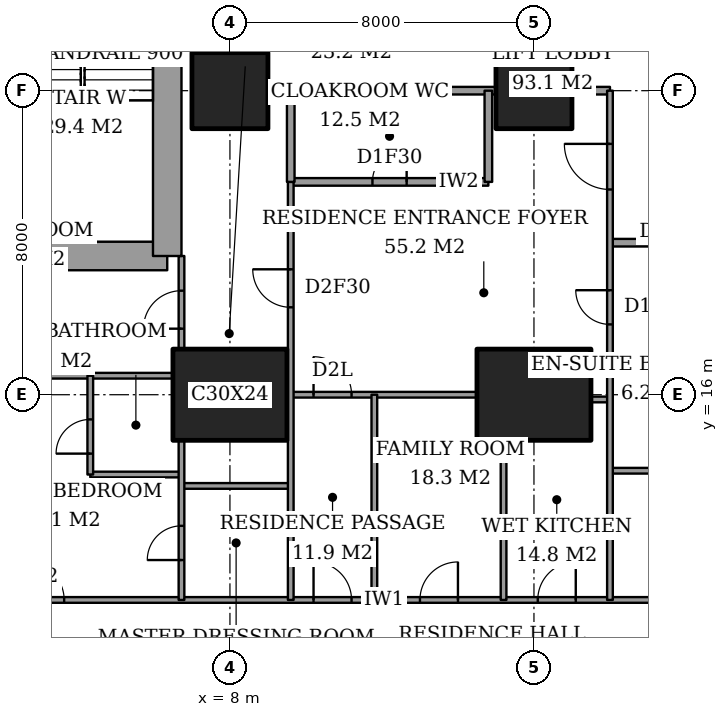
"""IFC4 building model, lengths in metres.
Left out: names, types, materials, properties, quantities, classifications, styles, units other than length and angle.
Written with IfcOpenShell. Run it as: python <this file> out.ifc"""

import sys

from ifc_helpers import new_model, si_unit, direction, frame, frame_2d, origin, origin_2d, place, context, subcontext, project, spatial, rectangle, extrude, element, fill, save


model = new_model("IFC4")
c1 = context("Model", 3, precision=1e-05, world=origin(), true_north=direction((0.0, 1.0)))
c2 = subcontext(c1, "Body", "Model", "MODEL_VIEW")
j1 = project(units=[si_unit("LENGTHUNIT", "METRE"), si_unit("PLANEANGLEUNIT", "RADIAN")], contexts=[c1])
p1 = place(None, origin())
s1 = spatial("IfcSite", under=j1, at=p1, CompositionType="ELEMENT")
p2 = place(p1, origin())
s2 = spatial("IfcBuilding", under=s1, at=p2, CompositionType="ELEMENT")
p3 = place(p2, frame((0.0, 0.0, 87.2)))
s3 = spatial("IfcBuildingStorey", under=s2, at=p3, CompositionType="ELEMENT", Elevation=87.2)
p4 = place(p3, frame((8.0, 16.0, 0.0), z_axis=(0.0, 0.0, 1.0), x_axis=(1.0, 0.0, 0.0)))
e1 = element("IfcColumn", 1, at=p4, inside=s3, PredefinedType="COLUMN", context=c2, shape_type="SweptSolid", body=[
    extrude(rectangle(XDim=3.0, YDim=2.4, at=origin_2d()), origin(), (0.0, 0.0, 1.0), 3.6),
])
p5 = place(p3, frame((8.0, 24.0, 0.0), z_axis=(0.0, 0.0, 1.0), x_axis=(1.0, 0.0, 0.0)))
e2 = element("IfcColumn", 2, at=p5, inside=s3, PredefinedType="COLUMN", context=c2, shape_type="SweptSolid", body=[
    extrude(rectangle(XDim=2.0, YDim=2.0, at=origin_2d()), origin(), (0.0, 0.0, 1.0), 3.6),
])
p6 = place(p3, frame((16.0, 16.0, 0.0), z_axis=(0.0, 0.0, 1.0), x_axis=(1.0, 0.0, 0.0)))
e3 = element("IfcColumn", 3, at=p6, inside=s3, PredefinedType="COLUMN", context=c2, shape_type="SweptSolid", body=[
    extrude(rectangle(XDim=3.0, YDim=2.4, at=origin_2d()), origin(), (0.0, 0.0, 1.0), 3.6),
])
p7 = place(p3, frame((16.0, 24.0, 0.0), z_axis=(0.0, 0.0, 1.0), x_axis=(1.0, 0.0, 0.0)))
e4 = element("IfcColumn", 4, at=p7, inside=s3, PredefinedType="COLUMN", context=c2, shape_type="SweptSolid", body=[
    extrude(rectangle(XDim=2.0, YDim=2.0, at=origin_2d()), origin(), (0.0, 0.0, 1.0), 3.6),
])
p8 = place(p3, frame((1.9, 19.65, 0.0), z_axis=(0.0, 0.0, 1.0), x_axis=(1.0, 0.0, 0.0)))
e5 = element("IfcWall", 5, at=p8, inside=s3, PredefinedType="SHEAR", context=c2, shape_type="SweptSolid", body=[
    extrude(rectangle(XDim=4.45, YDim=0.75, at=frame_2d((2.225, 0.0))), origin(), (0.0, 0.0, 1.0), 3.6),
])
p9 = place(p3, frame((6.35, 19.65, 0.0), z_axis=(0.0, 0.0, 1.0), x_axis=(0.0, 1.0, 0.0)))
e6 = element("IfcWall", 6, at=p9, inside=s3, PredefinedType="SHEAR", context=c2, shape_type="SweptSolid", body=[
    extrude(rectangle(XDim=8.7, YDim=0.75, at=frame_2d((4.35, 0.0))), origin(), (0.0, 0.0, 1.0), 3.6),
])
p10 = place(p9, frame((6.725, 0.0, 0.0)))
e7 = element("IfcOpeningElement", 7, at=p10, cuts=e6, PredefinedType="OPENING", context=c2, shape_type="SweptSolid", body=[
    extrude(rectangle(XDim=1.0, YDim=2.1, at=frame_2d((0.5, 1.05))), frame((0.0, 0.385, 0.0), z_axis=(0.0, -1.0, 0.0), x_axis=(1.0, 0.0, 0.0)), (0.0, 0.0, 1.0), 0.77),
])
p11 = place(p3, frame((-0.45, 10.6, 0.0), z_axis=(0.0, 0.0, 1.0), x_axis=(1.0, 0.0, 0.0)))
e8 = element("IfcWall", 8, at=p11, inside=s3, PredefinedType="PARTITIONING", context=c2, shape_type="SweptSolid", body=[
    extrude(rectangle(XDim=25.011, YDim=0.15, at=frame_2d((12.505, 0.0))), origin(), (0.0, 0.0, 1.0), 3.25),
])
p12 = place(p11, frame((10.65, 0.0, 0.0)))
e9 = element("IfcOpeningElement", 9, at=p12, cuts=e8, PredefinedType="OPENING", context=c2, shape_type="SweptSolid", body=[
    extrude(rectangle(XDim=1.0, YDim=2.1, at=frame_2d((0.5, 1.05))), frame((0.0, 0.085, 0.0), z_axis=(0.0, -1.0, 0.0), x_axis=(1.0, 0.0, 0.0)), (0.0, 0.0, 1.0), 0.17),
])
p13 = place(p11, frame((3.087, 0.0, 0.0)))
e10 = element("IfcOpeningElement", 10, at=p13, cuts=e8, PredefinedType="OPENING", context=c2, shape_type="SweptSolid", body=[
    extrude(rectangle(XDim=1.0, YDim=2.1, at=frame_2d((0.5, 1.05))), frame((0.0, 0.085, 0.0), z_axis=(0.0, -1.0, 0.0), x_axis=(1.0, 0.0, 0.0)), (0.0, 0.0, 1.0), 0.17),
])
p14 = place(p11, frame((13.45, 0.0, 0.0)))
e11 = element("IfcOpeningElement", 11, at=p14, cuts=e8, PredefinedType="OPENING", context=c2, shape_type="SweptSolid", body=[
    extrude(rectangle(XDim=1.0, YDim=2.1, at=frame_2d((0.5, 1.05))), frame((0.0, 0.085, 0.0), z_axis=(0.0, -1.0, 0.0), x_axis=(1.0, 0.0, 0.0)), (0.0, 0.0, 1.0), 0.17),
])
p15 = place(p11, frame((16.55, 0.0, 0.0)))
e12 = element("IfcOpeningElement", 12, at=p15, cuts=e8, PredefinedType="OPENING", context=c2, shape_type="SweptSolid", body=[
    extrude(rectangle(XDim=1.0, YDim=2.1, at=frame_2d((0.5, 1.05))), frame((0.0, 0.085, 0.0), z_axis=(0.0, -1.0, 0.0), x_axis=(1.0, 0.0, 0.0)), (0.0, 0.0, 1.0), 0.17),
])
p16 = place(p11, frame((21.175, 0.0, 0.0)))
e13 = element("IfcOpeningElement", 13, at=p16, cuts=e8, PredefinedType="OPENING", context=c2, shape_type="SweptSolid", body=[
    extrude(rectangle(XDim=1.0, YDim=2.1, at=frame_2d((0.5, 1.05))), frame((0.0, 0.085, 0.0), z_axis=(0.0, -1.0, 0.0), x_axis=(1.0, 0.0, 0.0)), (0.0, 0.0, 1.0), 0.17),
])
p17 = place(p3, frame((6.725, 13.6, 0.0), z_axis=(0.0, 0.0, 1.0), x_axis=(1.0, 0.0, 0.0)))
e14 = element("IfcWall", 14, at=p17, inside=s3, PredefinedType="PARTITIONING", context=c2, shape_type="SweptSolid", body=[
    extrude(rectangle(XDim=2.875, YDim=0.15, at=frame_2d((1.438, 0.0))), origin(), (0.0, 0.0, 1.0), 3.25),
])
p18 = place(p3, frame((4.325, 13.9, 0.0), z_axis=(0.0, 0.0, 1.0), x_axis=(1.0, 0.0, 0.0)))
e15 = element("IfcWall", 15, at=p18, inside=s3, PredefinedType="PARTITIONING", context=c2, shape_type="SweptSolid", body=[
    extrude(rectangle(XDim=2.4, YDim=0.15, at=frame_2d((1.2, 0.0))), origin(), (0.0, 0.0, 1.0), 3.25),
])
p19 = place(p3, frame((18.0, 14.0, 0.0), z_axis=(0.0, 0.0, 1.0), x_axis=(1.0, 0.0, 0.0)))
e16 = element("IfcWall", 16, at=p19, inside=s3, PredefinedType="PARTITIONING", context=c2, shape_type="SweptSolid", body=[
    extrude(rectangle(XDim=2.4, YDim=0.15, at=frame_2d((1.2, 0.0))), origin(), (0.0, 0.0, 1.0), 3.25),
])
p20 = place(p3, frame((17.5, 15.875, 0.0), z_axis=(0.0, 0.0, 1.0), x_axis=(1.0, 0.0, 0.0)))
e17 = element("IfcWall", 17, at=p20, inside=s3, PredefinedType="PARTITIONING", context=c2, shape_type="SweptSolid", body=[
    extrude(rectangle(XDim=0.5, YDim=0.15, at=frame_2d((0.25, 0.0))), origin(), (0.0, 0.0, 1.0), 3.25),
])
p21 = place(p3, frame((9.6, 16.0, 0.0), z_axis=(0.0, 0.0, 1.0), x_axis=(1.0, 0.0, 0.0)))
e18 = element("IfcWall", 18, at=p21, inside=s3, PredefinedType="PARTITIONING", context=c2, shape_type="SweptSolid", body=[
    extrude(rectangle(XDim=4.9, YDim=0.15, at=frame_2d((2.45, 0.0))), origin(), (0.0, 0.0, 1.0), 3.25),
])
p22 = place(p21, frame((0.6, 0.0, 0.0)))
e19 = element("IfcOpeningElement", 19, at=p22, cuts=e18, PredefinedType="OPENING", context=c2, shape_type="SweptSolid", body=[
    extrude(rectangle(XDim=1.0, YDim=2.0, at=frame_2d((0.5, 1.0))), frame((0.0, 0.085, 0.0), z_axis=(0.0, -1.0, 0.0), x_axis=(1.0, 0.0, 0.0)), (0.0, 0.0, 1.0), 0.17),
])
p23 = place(p3, frame((1.35, 16.5, 0.0), z_axis=(0.0, 0.0, 1.0), x_axis=(1.0, 0.0, 0.0)))
e20 = element("IfcWall", 20, at=p23, inside=s3, PredefinedType="PARTITIONING", context=c2, shape_type="SweptSolid", body=[
    extrude(rectangle(XDim=5.15, YDim=0.15, at=frame_2d((2.575, 0.0))), origin(), (0.0, 0.0, 1.0), 3.25),
])
p24 = place(p3, frame((18.0, 16.6, 0.0), z_axis=(0.0, 0.0, 1.0), x_axis=(1.0, 0.0, 0.0)))
e21 = element("IfcWall", 21, at=p24, inside=s3, PredefinedType="PARTITIONING", context=c2, shape_type="SweptSolid", body=[
    extrude(rectangle(XDim=6.0, YDim=0.15, at=frame_2d((3.0, 0.0))), origin(), (0.0, 0.0, 1.0), 3.25),
])
p25 = place(p3, frame((18.0, 20.0, 0.0), z_axis=(0.0, 0.0, 1.0), x_axis=(1.0, 0.0, 0.0)))
e22 = element("IfcWall", 22, at=p25, inside=s3, PredefinedType="PARTITIONING", context=c2, shape_type="SweptSolid", body=[
    extrude(rectangle(XDim=6.0, YDim=0.2, at=frame_2d((3.0, 0.0))), origin(), (0.0, 0.0, 1.0), 3.25),
])
p26 = place(p3, frame((9.6, 21.6, 0.0), z_axis=(0.0, 0.0, 1.0), x_axis=(1.0, 0.0, 0.0)))
e23 = element("IfcWall", 23, at=p26, inside=s3, PredefinedType="PARTITIONING", context=c2, shape_type="SweptSolid", body=[
    extrude(rectangle(XDim=5.2, YDim=0.2, at=frame_2d((2.6, 0.0))), origin(), (0.0, 0.0, 1.0), 3.25),
])
p27 = place(p26, frame((2.15, 0.0, 0.0)))
e24 = element("IfcOpeningElement", 24, at=p27, cuts=e23, PredefinedType="OPENING", context=c2, shape_type="SweptSolid", body=[
    extrude(rectangle(XDim=0.9, YDim=2.1, at=frame_2d((0.45, 1.05))), frame((0.0, 0.11, 0.0), z_axis=(0.0, -1.0, 0.0), x_axis=(1.0, 0.0, 0.0)), (0.0, 0.0, 1.0), 0.22),
])
p28 = place(p3, frame((9.0, 24.0, 0.0), z_axis=(0.0, 0.0, 1.0), x_axis=(1.0, 0.0, 0.0)))
e25 = element("IfcWall", 25, at=p28, inside=s3, PredefinedType="PARTITIONING", context=c2, shape_type="SweptSolid", body=[
    extrude(rectangle(XDim=6.0, YDim=0.2, at=frame_2d((3.0, 0.0))), origin(), (0.0, 0.0, 1.0), 3.25),
])
p29 = place(p3, frame((17.0, 24.0, 0.0), z_axis=(0.0, 0.0, 1.0), x_axis=(1.0, 0.0, 0.0)))
e26 = element("IfcWall", 26, at=p29, inside=s3, PredefinedType="PARTITIONING", context=c2, shape_type="SweptSolid", body=[
    extrude(rectangle(XDim=1.0, YDim=0.2, at=frame_2d((0.5, 0.0))), origin(), (0.0, 0.0, 1.0), 3.25),
])
p30 = place(p3, frame((4.325, 13.9, 0.0), z_axis=(0.0, 0.0, 1.0), x_axis=(0.0, 1.0, 0.0)))
e27 = element("IfcWall", 27, at=p30, inside=s3, PredefinedType="PARTITIONING", context=c2, shape_type="SweptSolid", body=[
    extrude(rectangle(XDim=2.6, YDim=0.15, at=frame_2d((1.3, 0.0))), origin(), (0.0, 0.0, 1.0), 3.25),
])
p31 = place(p30, frame((0.55, 0.0, 0.0)))
e28 = element("IfcOpeningElement", 28, at=p31, cuts=e27, PredefinedType="OPENING", context=c2, shape_type="SweptSolid", body=[
    extrude(rectangle(XDim=0.9, YDim=2.1, at=frame_2d((0.45, 1.05))), frame((0.0, 0.085, 0.0), z_axis=(0.0, -1.0, 0.0), x_axis=(1.0, 0.0, 0.0)), (0.0, 0.0, 1.0), 0.17),
])
p32 = place(p3, frame((6.725, 10.6, 0.0), z_axis=(0.0, 0.0, 1.0), x_axis=(0.0, 1.0, 0.0)))
e29 = element("IfcWall", 29, at=p32, inside=s3, PredefinedType="PARTITIONING", context=c2, shape_type="SweptSolid", body=[
    extrude(rectangle(XDim=4.2, YDim=0.15, at=frame_2d((2.1, 0.0))), origin(), (0.0, 0.0, 1.0), 3.25),
])
p33 = place(p32, frame((1.05, 0.0, 0.0)))
e30 = element("IfcOpeningElement", 30, at=p33, cuts=e29, PredefinedType="OPENING", context=c2, shape_type="SweptSolid", body=[
    extrude(rectangle(XDim=0.9, YDim=2.1, at=frame_2d((0.45, 1.05))), frame((0.0, 0.085, 0.0), z_axis=(0.0, -1.0, 0.0), x_axis=(1.0, 0.0, 0.0)), (0.0, 0.0, 1.0), 0.17),
])
p34 = place(p3, frame((6.725, 17.2, 0.0), z_axis=(0.0, 0.0, 1.0), x_axis=(0.0, 1.0, 0.0)))
e31 = element("IfcWall", 31, at=p34, inside=s3, PredefinedType="PARTITIONING", context=c2, shape_type="SweptSolid", body=[
    extrude(rectangle(XDim=2.45, YDim=0.15, at=frame_2d((1.225, 0.0))), origin(), (0.0, 0.0, 1.0), 3.25),
])
p35 = place(p34, frame((0.538, 0.0, 0.0)))
e32 = element("IfcOpeningElement", 32, at=p35, cuts=e31, PredefinedType="OPENING", context=c2, shape_type="SweptSolid", body=[
    extrude(rectangle(XDim=1.0, YDim=2.1, at=frame_2d((0.5, 1.05))), frame((0.0, 0.085, 0.0), z_axis=(0.0, -1.0, 0.0), x_axis=(1.0, 0.0, 0.0)), (0.0, 0.0, 1.0), 0.17),
])
p36 = place(p3, frame((9.6, 21.6, 0.0), z_axis=(0.0, 0.0, 1.0), x_axis=(0.0, 1.0, 0.0)))
e33 = element("IfcWall", 33, at=p36, inside=s3, PredefinedType="PARTITIONING", context=c2, shape_type="SweptSolid", body=[
    extrude(rectangle(XDim=2.4, YDim=0.2, at=frame_2d((1.2, 0.0))), origin(), (0.0, 0.0, 1.0), 3.25),
])
p37 = place(p3, frame((9.6, 10.6, 0.0), z_axis=(0.0, 0.0, 1.0), x_axis=(0.0, 1.0, 0.0)))
e34 = element("IfcWall", 34, at=p37, inside=s3, PredefinedType="PARTITIONING", context=c2, shape_type="SweptSolid", body=[
    extrude(rectangle(XDim=11.0, YDim=0.15, at=frame_2d((5.5, 0.0))), origin(), (0.0, 0.0, 1.0), 3.25),
])
p38 = place(p37, frame((7.7, 0.0, 0.0)))
e35 = element("IfcOpeningElement", 35, at=p38, cuts=e34, PredefinedType="OPENING", context=c2, shape_type="SweptSolid", body=[
    extrude(rectangle(XDim=1.0, YDim=2.1, at=frame_2d((0.5, 1.05))), frame((0.0, 0.085, 0.0), z_axis=(0.0, -1.0, 0.0), x_axis=(1.0, 0.0, 0.0)), (0.0, 0.0, 1.0), 0.17),
])
p39 = place(p3, frame((11.8, 10.6, 0.0), z_axis=(0.0, 0.0, 1.0), x_axis=(0.0, 1.0, 0.0)))
e36 = element("IfcWall", 36, at=p39, inside=s3, PredefinedType="PARTITIONING", context=c2, shape_type="SweptSolid", body=[
    extrude(rectangle(XDim=5.4, YDim=0.15, at=frame_2d((2.7, 0.0))), origin(), (0.0, 0.0, 1.0), 3.25),
])
p40 = place(p3, frame((14.8, 21.6, 0.0), z_axis=(0.0, 0.0, 1.0), x_axis=(0.0, 1.0, 0.0)))
e37 = element("IfcWall", 37, at=p40, inside=s3, PredefinedType="PARTITIONING", context=c2, shape_type="SweptSolid", body=[
    extrude(rectangle(XDim=2.4, YDim=0.2, at=frame_2d((1.2, 0.0))), origin(), (0.0, 0.0, 1.0), 3.25),
])
p41 = place(p3, frame((15.2, 10.6, 0.0), z_axis=(0.0, 0.0, 1.0), x_axis=(0.0, 1.0, 0.0)))
e38 = element("IfcWall", 38, at=p41, inside=s3, PredefinedType="PARTITIONING", context=c2, shape_type="SweptSolid", body=[
    extrude(rectangle(XDim=4.2, YDim=0.15, at=frame_2d((2.1, 0.0))), origin(), (0.0, 0.0, 1.0), 3.25),
])
p42 = place(p3, frame((18.0, 10.6, 0.0), z_axis=(0.0, 0.0, 1.0), x_axis=(0.0, 1.0, 0.0)))
e39 = element("IfcWall", 39, at=p42, inside=s3, PredefinedType="PARTITIONING", context=c2, shape_type="SweptSolid", body=[
    extrude(rectangle(XDim=13.4, YDim=0.15, at=frame_2d((6.7, 0.0))), origin(), (0.0, 0.0, 1.0), 3.25),
])
p43 = place(p42, frame((10.8, 0.0, 0.0)))
e40 = element("IfcOpeningElement", 40, at=p43, cuts=e39, PredefinedType="OPENING", context=c2, shape_type="SweptSolid", body=[
    extrude(rectangle(XDim=1.2, YDim=2.4, at=frame_2d((0.6, 1.2))), frame((0.0, 0.085, 0.0), z_axis=(0.0, -1.0, 0.0), x_axis=(1.0, 0.0, 0.0)), (0.0, 0.0, 1.0), 0.17),
])
p44 = place(p42, frame((7.25, 0.0, 0.0)))
e41 = element("IfcOpeningElement", 41, at=p44, cuts=e39, PredefinedType="OPENING", context=c2, shape_type="SweptSolid", body=[
    extrude(rectangle(XDim=0.9, YDim=2.1, at=frame_2d((0.45, 1.05))), frame((0.0, 0.085, 0.0), z_axis=(0.0, -1.0, 0.0), x_axis=(1.0, 0.0, 0.0)), (0.0, 0.0, 1.0), 0.17),
])
p45 = place(p12, origin())
e42 = element("IfcDoor", 42, at=p45, inside=s3, OperationType="SINGLE_SWING_RIGHT", PredefinedType="DOOR", context=c2, shape_type="SweptSolid", body=[
    extrude(rectangle(XDim=1.0, YDim=2.1, at=frame_2d((0.5, 1.05))), frame((0.0, 0.025, 0.0), z_axis=(0.0, -1.0, 0.0), x_axis=(1.0, 0.0, 0.0)), (0.0, 0.0, 1.0), 0.05),
])
fill(e9, e42)
p46 = place(p31, origin())
e43 = element("IfcDoor", 43, at=p46, inside=s3, OperationType="SINGLE_SWING_RIGHT", PredefinedType="DOOR", context=c2, shape_type="SweptSolid", body=[
    extrude(rectangle(XDim=0.9, YDim=2.1, at=frame_2d((0.45, 1.05))), frame((0.0, 0.025, 0.0), z_axis=(0.0, -1.0, 0.0), x_axis=(1.0, 0.0, 0.0)), (0.0, 0.0, 1.0), 0.05),
])
fill(e28, e43)
p47 = place(p13, origin())
e44 = element("IfcDoor", 44, at=p47, inside=s3, OperationType="SINGLE_SWING_RIGHT", PredefinedType="DOOR", context=c2, shape_type="SweptSolid", body=[
    extrude(rectangle(XDim=1.0, YDim=2.1, at=frame_2d((0.5, 1.05))), frame((0.0, 0.025, 0.0), z_axis=(0.0, -1.0, 0.0), x_axis=(1.0, 0.0, 0.0)), (0.0, 0.0, 1.0), 0.05),
])
fill(e10, e44)
p48 = place(p35, origin())
e45 = element("IfcDoor", 45, at=p48, inside=s3, OperationType="SINGLE_SWING_RIGHT", PredefinedType="DOOR", context=c2, shape_type="SweptSolid", body=[
    extrude(rectangle(XDim=1.0, YDim=2.1, at=frame_2d((0.5, 1.05))), frame((0.0, 0.025, 0.0), z_axis=(0.0, -1.0, 0.0), x_axis=(1.0, 0.0, 0.0)), (0.0, 0.0, 1.0), 0.05),
])
fill(e32, e45)
p49 = place(p33, origin())
e46 = element("IfcDoor", 46, at=p49, inside=s3, OperationType="SINGLE_SWING_RIGHT", PredefinedType="DOOR", context=c2, shape_type="SweptSolid", body=[
    extrude(rectangle(XDim=0.9, YDim=2.1, at=frame_2d((0.45, 1.05))), frame((0.0, 0.025, 0.0), z_axis=(0.0, -1.0, 0.0), x_axis=(1.0, 0.0, 0.0)), (0.0, 0.0, 1.0), 0.05),
])
fill(e30, e46)
p50 = place(p38, origin())
e47 = element("IfcDoor", 47, at=p50, inside=s3, OperationType="SINGLE_SWING_LEFT", PredefinedType="DOOR", context=c2, shape_type="SweptSolid", body=[
    extrude(rectangle(XDim=1.0, YDim=2.1, at=frame_2d((0.5, 1.05))), frame((0.0, 0.025, 0.0), z_axis=(0.0, -1.0, 0.0), x_axis=(1.0, 0.0, 0.0)), (0.0, 0.0, 1.0), 0.05),
])
fill(e35, e47)
p51 = place(p27, origin())
e48 = element("IfcDoor", 48, at=p51, inside=s3, OperationType="SINGLE_SWING_LEFT", PredefinedType="DOOR", context=c2, shape_type="SweptSolid", body=[
    extrude(rectangle(XDim=0.9, YDim=2.1, at=frame_2d((0.45, 1.05))), frame((0.0, 0.025, 0.0), z_axis=(0.0, -1.0, 0.0), x_axis=(1.0, 0.0, 0.0)), (0.0, 0.0, 1.0), 0.05),
])
fill(e24, e48)
p52 = place(p43, origin())
e49 = element("IfcDoor", 49, at=p52, inside=s3, OperationType="SINGLE_SWING_LEFT", PredefinedType="DOOR", context=c2, shape_type="SweptSolid", body=[
    extrude(rectangle(XDim=1.2, YDim=2.4, at=frame_2d((0.6, 1.2))), frame((0.0, 0.025, 0.0), z_axis=(0.0, -1.0, 0.0), x_axis=(1.0, 0.0, 0.0)), (0.0, 0.0, 1.0), 0.05),
])
fill(e40, e49)
p53 = place(p22, origin())
e50 = element("IfcDoor", 50, at=p53, inside=s3, OperationType="SINGLE_SWING_RIGHT", PredefinedType="DOOR", context=c2, shape_type="SweptSolid", body=[
    extrude(rectangle(XDim=1.0, YDim=2.0, at=frame_2d((0.5, 1.0))), frame((0.0, 0.025, 0.0), z_axis=(0.0, -1.0, 0.0), x_axis=(1.0, 0.0, 0.0)), (0.0, 0.0, 1.0), 0.05),
])
fill(e19, e50)
p54 = place(p14, origin())
e51 = element("IfcDoor", 51, at=p54, inside=s3, OperationType="SINGLE_SWING_LEFT", PredefinedType="DOOR", context=c2, shape_type="SweptSolid", body=[
    extrude(rectangle(XDim=1.0, YDim=2.1, at=frame_2d((0.5, 1.05))), frame((0.0, 0.025, 0.0), z_axis=(0.0, -1.0, 0.0), x_axis=(1.0, 0.0, 0.0)), (0.0, 0.0, 1.0), 0.05),
])
fill(e11, e51)
p55 = place(p15, origin())
e52 = element("IfcDoor", 52, at=p55, inside=s3, OperationType="SINGLE_SWING_LEFT", PredefinedType="DOOR", context=c2, shape_type="SweptSolid", body=[
    extrude(rectangle(XDim=1.0, YDim=2.1, at=frame_2d((0.5, 1.05))), frame((0.0, 0.025, 0.0), z_axis=(0.0, -1.0, 0.0), x_axis=(1.0, 0.0, 0.0)), (0.0, 0.0, 1.0), 0.05),
])
fill(e12, e52)
p56 = place(p44, origin())
e53 = element("IfcDoor", 53, at=p56, inside=s3, OperationType="SINGLE_SWING_LEFT", PredefinedType="DOOR", context=c2, shape_type="SweptSolid", body=[
    extrude(rectangle(XDim=0.9, YDim=2.1, at=frame_2d((0.45, 1.05))), frame((0.0, 0.025, 0.0), z_axis=(0.0, -1.0, 0.0), x_axis=(1.0, 0.0, 0.0)), (0.0, 0.0, 1.0), 0.05),
])
fill(e41, e53)
save(model, sys.argv[1])
